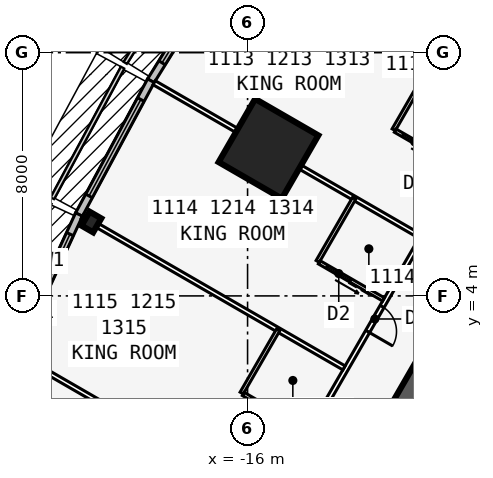
"""IFC4 building model, lengths in metres.
Left out: names, types, materials, properties, quantities, classifications, styles, units other than length and angle.
Written with IfcOpenShell. Run it as: python <this file> out.ifc"""

import sys

from ifc_helpers import new_model, si_unit, direction, frame, frame_2d, origin, origin_2d, place, context, subcontext, project, spatial, rectangle, i_section, extrude, element, fill, save


model = new_model("IFC4")
c1 = context("Model", 3, precision=1e-05, world=origin(), true_north=direction((0.0, 1.0)))
c2 = subcontext(c1, "Body", "Model", "MODEL_VIEW")
j1 = project(units=[si_unit("LENGTHUNIT", "METRE"), si_unit("PLANEANGLEUNIT", "RADIAN")], contexts=[c1])
p1 = place(None, origin())
s1 = spatial("IfcSite", under=j1, at=p1, CompositionType="ELEMENT")
p2 = place(p1, origin())
s2 = spatial("IfcBuilding", under=s1, at=p2, CompositionType="ELEMENT")
p3 = place(p2, frame((0.0, 0.0, 48.9)))
s3 = spatial("IfcBuildingStorey", under=s2, at=p3, CompositionType="ELEMENT", Elevation=48.9)
p4 = place(p3, frame((0.0, 19.052, 0.0), z_axis=(0.0, 0.0, 1.0), x_axis=(-0.499999749417, -0.866025548458, 0.0)))
e1 = element("IfcWall", 1, at=p4, inside=s3, PredefinedType="SHEAR", context=c2, shape_type="SweptSolid", body=[
    extrude(rectangle(XDim=33.0, YDim=0.9, at=frame_2d((16.5, 0.0))), origin(), (0.0, 0.0, 1.0), 3.4),
])
p5 = place(p4, frame((14.15, 0.0, 0.0)))
e2 = element("IfcOpeningElement", 2, at=p5, cuts=e1, PredefinedType="OPENING", context=c2, shape_type="SweptSolid", body=[
    extrude(rectangle(XDim=1.8, YDim=2.13, at=frame_2d((0.9, 1.065))), frame((0.0, 0.46, 0.0), z_axis=(0.0, -1.0, 0.0), x_axis=(1.0, 0.0, 0.0)), (0.0, 0.0, 1.0), 0.92),
])
p6 = place(p4, frame((12.6, 0.0, 0.0)))
e3 = element("IfcOpeningElement", 3, at=p6, cuts=e1, PredefinedType="OPENING", context=c2, shape_type="SweptSolid", body=[
    extrude(rectangle(XDim=1.0, YDim=2.13, at=frame_2d((0.5, 1.065))), frame((0.0, 0.46, 0.0), z_axis=(0.0, -1.0, 0.0), x_axis=(1.0, 0.0, 0.0)), (0.0, 0.0, 1.0), 0.92),
])
p7 = place(p3, frame((-21.137, 6.43, 0.0), z_axis=(0.0, 0.0, 1.0), x_axis=(-0.866025403784, 0.5, 0.0)))
e4 = element("IfcColumn", 4, at=p7, inside=s3, PredefinedType="COLUMN", context=c2, shape_type="SweptSolid", body=[
    extrude(i_section(OverallWidth=0.442, OverallDepth=0.531, WebThickness=0.066, FlangeThickness=0.106, at=origin_2d()), origin(), (0.0, 0.0, 1.0), 3.4),
])
p8 = place(p3, frame((-15.312, 8.84, 0.0), z_axis=(0.0, 0.0, 1.0), x_axis=(-0.866025403784, 0.5, 0.0)))
e5 = element("IfcColumn", 5, at=p8, inside=s3, PredefinedType="COLUMN", context=c2, shape_type="SweptSolid", body=[
    extrude(rectangle(XDim=2.4, YDim=2.4, at=origin_2d()), origin(), (0.0, 0.0, 1.0), 3.4),
])
p9 = place(p3, frame((-16.551, 15.324, 0.0), z_axis=(0.0, 0.0, 1.0), x_axis=(-0.526132807704, -0.850402415717, 0.0)))
e6 = element("IfcWall", 6, at=p9, inside=s3, PredefinedType="STANDARD", context=c2, shape_type="SweptSolid", body=[
    extrude(rectangle(XDim=5.002, YDim=0.25, at=frame_2d((2.501, 0.0))), origin(), (0.0, 0.0, 1.0), 3.235),
])
p10 = place(p9, frame((0.701, 0.0, 0.45)))
e7 = element("IfcOpeningElement", 7, at=p10, cuts=e6, PredefinedType="OPENING", context=c2, shape_type="SweptSolid", body=[
    extrude(rectangle(XDim=3.6, YDim=2.4, at=frame_2d((1.8, 1.2))), frame((0.0, 0.135, 0.0), z_axis=(0.0, -1.0, 0.0), x_axis=(1.0, 0.0, 0.0)), (0.0, 0.0, 1.0), 0.27),
])
p11 = place(p3, frame((-19.178, 11.077, 0.0), z_axis=(0.0, 0.0, 1.0), x_axis=(-0.473412820489, -0.880840678782, 0.0)))
e8 = element("IfcWall", 8, at=p11, inside=s3, PredefinedType="STANDARD", context=c2, shape_type="SweptSolid", body=[
    extrude(rectangle(XDim=5.002, YDim=0.25, at=frame_2d((2.501, 0.0))), origin(), (0.0, 0.0, 1.0), 3.235),
])
p12 = place(p11, frame((0.701, 0.0, 0.45)))
e9 = element("IfcOpeningElement", 9, at=p12, cuts=e8, PredefinedType="OPENING", context=c2, shape_type="SweptSolid", body=[
    extrude(rectangle(XDim=3.6, YDim=2.4, at=frame_2d((1.8, 1.2))), frame((0.0, 0.135, 0.0), z_axis=(0.0, -1.0, 0.0), x_axis=(1.0, 0.0, 0.0)), (0.0, 0.0, 1.0), 0.27),
])
p13 = place(p3, frame((-21.543, 6.678, 0.0), z_axis=(0.0, 0.0, 1.0), x_axis=(-0.419203100754, -0.907892482796, 0.0)))
e10 = element("IfcWall", 10, at=p13, inside=s3, PredefinedType="STANDARD", context=c2, shape_type="SweptSolid", body=[
    extrude(rectangle(XDim=5.021, YDim=0.25, at=frame_2d((2.51, 0.0))), origin(), (0.0, 0.0, 1.0), 3.235),
])
p14 = place(p13, frame((0.71, 0.0, 0.45)))
e11 = element("IfcOpeningElement", 11, at=p14, cuts=e10, PredefinedType="OPENING", context=c2, shape_type="SweptSolid", body=[
    extrude(rectangle(XDim=3.6, YDim=2.4, at=frame_2d((1.8, 1.2))), frame((0.0, 0.135, 0.0), z_axis=(0.0, -1.0, 0.0), x_axis=(1.0, 0.0, 0.0)), (0.0, 0.0, 1.0), 0.27),
])
p15 = place(p3, frame((-0.5, 22.836, 0.0), z_axis=(0.0, 0.0, 1.0), x_axis=(-0.500001677587, -0.866024435227, 0.0)))
e12 = element("IfcWall", 12, at=p15, inside=s3, PredefinedType="PARTITIONING", context=c2, shape_type="SweptSolid", body=[
    extrude(rectangle(XDim=39.054, YDim=0.15, at=frame_2d((19.527, 0.0))), origin(), (0.0, 0.0, 1.0), 3.235),
])
p16 = place(p15, frame((1.558, 0.0, 0.0)))
e13 = element("IfcOpeningElement", 13, at=p16, cuts=e12, PredefinedType="OPENING", context=c2, shape_type="SweptSolid", body=[
    extrude(rectangle(XDim=0.95, YDim=2.13, at=frame_2d((0.475, 1.065))), frame((0.0, 0.085, 0.0), z_axis=(0.0, -1.0, 0.0), x_axis=(1.0, 0.0, 0.0)), (0.0, 0.0, 1.0), 0.17),
])
p17 = place(p15, frame((12.752, 0.0, 0.0)))
e14 = element("IfcOpeningElement", 14, at=p17, cuts=e12, PredefinedType="OPENING", context=c2, shape_type="SweptSolid", body=[
    extrude(rectangle(XDim=0.95, YDim=2.13, at=frame_2d((0.475, 1.065))), frame((0.0, 0.085, 0.0), z_axis=(0.0, -1.0, 0.0), x_axis=(1.0, 0.0, 0.0)), (0.0, 0.0, 1.0), 0.17),
])
p18 = place(p15, frame((17.152, 0.0, 0.0)))
e15 = element("IfcOpeningElement", 15, at=p18, cuts=e12, PredefinedType="OPENING", context=c2, shape_type="SweptSolid", body=[
    extrude(rectangle(XDim=0.95, YDim=2.13, at=frame_2d((0.475, 1.065))), frame((0.0, 0.085, 0.0), z_axis=(0.0, -1.0, 0.0), x_axis=(1.0, 0.0, 0.0)), (0.0, 0.0, 1.0), 0.17),
])
p19 = place(p15, frame((22.152, 0.0, 0.0)))
e16 = element("IfcOpeningElement", 16, at=p19, cuts=e12, PredefinedType="OPENING", context=c2, shape_type="SweptSolid", body=[
    extrude(rectangle(XDim=0.95, YDim=2.13, at=frame_2d((0.475, 1.065))), frame((0.0, 0.085, 0.0), z_axis=(0.0, -1.0, 0.0), x_axis=(1.0, 0.0, 0.0)), (0.0, 0.0, 1.0), 0.17),
])
p20 = place(p15, frame((27.152, 0.0, 0.0)))
e17 = element("IfcOpeningElement", 17, at=p20, cuts=e12, PredefinedType="OPENING", context=c2, shape_type="SweptSolid", body=[
    extrude(rectangle(XDim=0.95, YDim=2.13, at=frame_2d((0.475, 1.065))), frame((0.0, 0.085, 0.0), z_axis=(0.0, -1.0, 0.0), x_axis=(1.0, 0.0, 0.0)), (0.0, 0.0, 1.0), 0.17),
])
p21 = place(p15, frame((36.546, 0.0, 0.0)))
e18 = element("IfcOpeningElement", 18, at=p21, cuts=e12, PredefinedType="OPENING", context=c2, shape_type="SweptSolid", body=[
    extrude(rectangle(XDim=0.95, YDim=2.13, at=frame_2d((0.475, 1.065))), frame((0.0, 0.085, 0.0), z_axis=(0.0, -1.0, 0.0), x_axis=(1.0, 0.0, 0.0)), (0.0, 0.0, 1.0), 0.17),
])
p22 = place(p3, frame((-7.829, 10.293, 0.0), z_axis=(0.0, 0.0, 1.0), x_axis=(-0.866016302457, 0.50001576363, 0.0)))
e19 = element("IfcWall", 19, at=p22, inside=s3, PredefinedType="PARTITIONING", context=c2, shape_type="SweptSolid", body=[
    extrude(rectangle(XDim=9.943, YDim=0.15, at=frame_2d((4.972, 0.0))), origin(), (0.0, 0.0, 1.0), 2.389),
])
p23 = place(p3, frame((-10.329, 5.963, 0.0), z_axis=(0.0, 0.0, 1.0), x_axis=(-0.866021688545, 0.500006434927, 0.0)))
e20 = element("IfcWall", 20, at=p23, inside=s3, PredefinedType="PARTITIONING", context=c2, shape_type="SweptSolid", body=[
    extrude(rectangle(XDim=10.096, YDim=0.15, at=frame_2d((5.048, 0.0))), origin(), (0.0, 0.0, 1.0), 2.389),
])
p24 = place(p3, frame((-12.829, 1.633, 0.0), z_axis=(0.0, 0.0, 1.0), x_axis=(-0.866026934769, 0.499997348248, 0.0)))
e21 = element("IfcWall", 21, at=p24, inside=s3, PredefinedType="PARTITIONING", context=c2, shape_type="SweptSolid", body=[
    extrude(rectangle(XDim=9.943, YDim=0.15, at=frame_2d((4.971, 0.0))), origin(), (0.0, 0.0, 1.0), 2.389),
])
p25 = place(p3, frame((-15.329, -2.697, 0.0), z_axis=(0.0, 0.0, 1.0), x_axis=(-0.866018409083, 0.500012114982, 0.0)))
e22 = element("IfcWall", 22, at=p25, inside=s3, PredefinedType="PARTITIONING", context=c2, shape_type="SweptSolid", body=[
    extrude(rectangle(XDim=9.485, YDim=0.15, at=frame_2d((4.742, 0.0))), origin(), (0.0, 0.0, 1.0), 2.389),
])
p26 = place(p3, frame((-9.993, 11.543, 0.0), z_axis=(0.0, 0.0, 1.0), x_axis=(-0.500077600433, -0.865980596518, 0.0)))
e23 = element("IfcWall", 23, at=p26, inside=s3, PredefinedType="PLUMBINGWALL", context=c2, shape_type="SweptSolid", body=[
    extrude(rectangle(XDim=2.4, YDim=0.12, at=frame_2d((1.2, 0.0))), origin(), (0.0, 0.0, 1.0), 3.235),
])
p27 = place(p3, frame((-9.029, 8.215, 0.0), z_axis=(0.0, 0.0, 1.0), x_axis=(-0.866023955769, 0.500002508028, 0.0)))
e24 = element("IfcWall", 24, at=p27, inside=s3, PredefinedType="PLUMBINGWALL", context=c2, shape_type="SweptSolid", body=[
    extrude(rectangle(XDim=2.44, YDim=0.12, at=frame_2d((1.22, 0.0))), origin(), (0.0, 0.0, 1.0), 3.235),
])
p28 = place(p27, frame((1.25, 0.0, 0.0)))
e25 = element("IfcOpeningElement", 25, at=p28, cuts=e24, PredefinedType="OPENING", context=c2, shape_type="SweptSolid", body=[
    extrude(rectangle(XDim=0.9, YDim=2.13, at=frame_2d((0.45, 1.065))), frame((0.0, 0.07, 0.0), z_axis=(0.0, -1.0, 0.0), x_axis=(1.0, 0.0, 0.0)), (0.0, 0.0, 1.0), 0.14),
])
p29 = place(p3, frame((-12.493, 7.213, 0.0), z_axis=(0.0, 0.0, 1.0), x_axis=(-0.500077600433, -0.865980596518, 0.0)))
e26 = element("IfcWall", 26, at=p29, inside=s3, PredefinedType="PLUMBINGWALL", context=c2, shape_type="SweptSolid", body=[
    extrude(rectangle(XDim=2.4, YDim=0.12, at=frame_2d((1.2, 0.0))), origin(), (0.0, 0.0, 1.0), 3.235),
])
p30 = place(p3, frame((-11.529, 3.885, 0.0), z_axis=(0.0, 0.0, 1.0), x_axis=(-0.866023955769, 0.500002508028, 0.0)))
e27 = element("IfcWall", 27, at=p30, inside=s3, PredefinedType="PLUMBINGWALL", context=c2, shape_type="SweptSolid", body=[
    extrude(rectangle(XDim=2.44, YDim=0.12, at=frame_2d((1.22, 0.0))), origin(), (0.0, 0.0, 1.0), 3.235),
])
p31 = place(p30, frame((1.25, 0.0, 0.0)))
e28 = element("IfcOpeningElement", 28, at=p31, cuts=e27, PredefinedType="OPENING", context=c2, shape_type="SweptSolid", body=[
    extrude(rectangle(XDim=0.9, YDim=2.13, at=frame_2d((0.45, 1.065))), frame((0.0, 0.07, 0.0), z_axis=(0.0, -1.0, 0.0), x_axis=(1.0, 0.0, 0.0)), (0.0, 0.0, 1.0), 0.14),
])
p32 = place(p3, frame((-14.993, 2.883, 0.0), z_axis=(0.0, 0.0, 1.0), x_axis=(-0.500077600433, -0.865980596518, 0.0)))
e29 = element("IfcWall", 29, at=p32, inside=s3, PredefinedType="PLUMBINGWALL", context=c2, shape_type="SweptSolid", body=[
    extrude(rectangle(XDim=2.4, YDim=0.12, at=frame_2d((1.2, 0.0))), origin(), (0.0, 0.0, 1.0), 3.235),
])
p33 = place(p3, frame((-14.029, -0.445, 0.0), z_axis=(0.0, 0.0, 1.0), x_axis=(-0.866023955769, 0.500002508028, 0.0)))
e30 = element("IfcWall", 30, at=p33, inside=s3, PredefinedType="PLUMBINGWALL", context=c2, shape_type="SweptSolid", body=[
    extrude(rectangle(XDim=2.44, YDim=0.12, at=frame_2d((1.22, 0.0))), origin(), (0.0, 0.0, 1.0), 3.235),
])
p34 = place(p33, frame((1.25, 0.0, 0.0)))
e31 = element("IfcOpeningElement", 31, at=p34, cuts=e30, PredefinedType="OPENING", context=c2, shape_type="SweptSolid", body=[
    extrude(rectangle(XDim=0.9, YDim=2.13, at=frame_2d((0.45, 1.065))), frame((0.0, 0.07, 0.0), z_axis=(0.0, -1.0, 0.0), x_axis=(1.0, 0.0, 0.0)), (0.0, 0.0, 1.0), 0.14),
])
p35 = place(p10, origin())
e32 = element("IfcWindow", 32, at=p35, inside=s3, PartitioningType="SINGLE_PANEL", PredefinedType="WINDOW", context=c2, shape_type="SweptSolid", body=[
    extrude(rectangle(XDim=3.6, YDim=2.4, at=frame_2d((1.8, 1.2))), frame((0.0, 0.03, 0.0), z_axis=(0.0, -1.0, 0.0), x_axis=(1.0, 0.0, 0.0)), (0.0, 0.0, 1.0), 0.06),
])
fill(e7, e32)
p36 = place(p12, origin())
e33 = element("IfcWindow", 33, at=p36, inside=s3, PartitioningType="SINGLE_PANEL", PredefinedType="WINDOW", context=c2, shape_type="SweptSolid", body=[
    extrude(rectangle(XDim=3.6, YDim=2.4, at=frame_2d((1.8, 1.2))), frame((0.0, 0.03, 0.0), z_axis=(0.0, -1.0, 0.0), x_axis=(1.0, 0.0, 0.0)), (0.0, 0.0, 1.0), 0.06),
])
fill(e9, e33)
p37 = place(p14, origin())
e34 = element("IfcWindow", 34, at=p37, inside=s3, PartitioningType="SINGLE_PANEL", PredefinedType="WINDOW", context=c2, shape_type="SweptSolid", body=[
    extrude(rectangle(XDim=3.6, YDim=2.4, at=frame_2d((1.8, 1.2))), frame((0.0, 0.03, 0.0), z_axis=(0.0, -1.0, 0.0), x_axis=(1.0, 0.0, 0.0)), (0.0, 0.0, 1.0), 0.06),
])
fill(e11, e34)
p38 = place(p28, origin())
e35 = element("IfcDoor", 35, at=p38, inside=s3, OperationType="SLIDING_TO_LEFT", PredefinedType="DOOR", context=c2, shape_type="SweptSolid", body=[
    extrude(rectangle(XDim=0.9, YDim=2.13, at=frame_2d((0.45, 1.065))), frame((0.0, 0.025, 0.0), z_axis=(0.0, -1.0, 0.0), x_axis=(1.0, 0.0, 0.0)), (0.0, 0.0, 1.0), 0.05),
])
fill(e25, e35)
p39 = place(p31, origin())
e36 = element("IfcDoor", 36, at=p39, inside=s3, OperationType="SLIDING_TO_LEFT", PredefinedType="DOOR", context=c2, shape_type="SweptSolid", body=[
    extrude(rectangle(XDim=0.9, YDim=2.13, at=frame_2d((0.45, 1.065))), frame((0.0, 0.025, 0.0), z_axis=(0.0, -1.0, 0.0), x_axis=(1.0, 0.0, 0.0)), (0.0, 0.0, 1.0), 0.05),
])
fill(e28, e36)
p40 = place(p19, origin())
e37 = element("IfcDoor", 37, at=p40, inside=s3, OperationType="SINGLE_SWING_RIGHT", PredefinedType="DOOR", context=c2, shape_type="SweptSolid", body=[
    extrude(rectangle(XDim=0.95, YDim=2.13, at=frame_2d((0.475, 1.065))), frame((0.0, 0.025, 0.0), z_axis=(0.0, -1.0, 0.0), x_axis=(1.0, 0.0, 0.0)), (0.0, 0.0, 1.0), 0.05),
])
fill(e16, e37)
p41 = place(p34, origin())
e38 = element("IfcDoor", 38, at=p41, inside=s3, OperationType="SLIDING_TO_LEFT", PredefinedType="DOOR", context=c2, shape_type="SweptSolid", body=[
    extrude(rectangle(XDim=0.9, YDim=2.13, at=frame_2d((0.45, 1.065))), frame((0.0, 0.025, 0.0), z_axis=(0.0, -1.0, 0.0), x_axis=(1.0, 0.0, 0.0)), (0.0, 0.0, 1.0), 0.05),
])
fill(e31, e38)
save(model, sys.argv[1])
